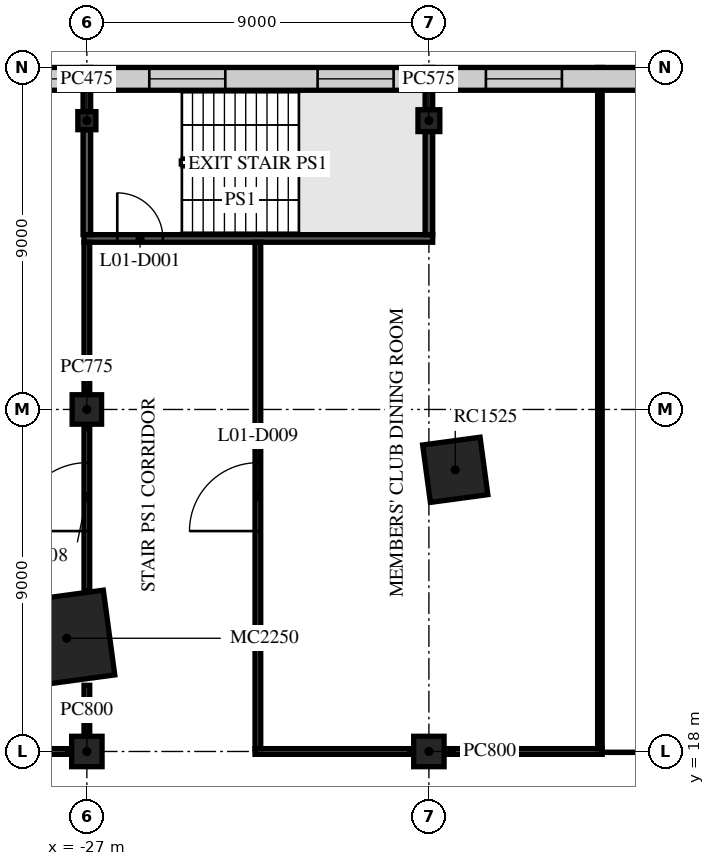
"""IFC4 building model, lengths in metres.
Left out: names, types, materials, properties, quantities, classifications, styles, units other than length and angle.
Written with IfcOpenShell. Run it as: python <this file> out.ifc"""

import sys

from ifc_helpers import new_model, si_unit, direction, frame, frame_2d, origin, origin_2d, place, context, subcontext, project, spatial, rectangle, extrude, element, fill, save


model = new_model("IFC4")
c1 = context("Model", 3, precision=1e-05, world=origin(), true_north=direction((0.0, 1.0)))
c2 = subcontext(c1, "Body", "Model", "MODEL_VIEW")
j1 = project(units=[si_unit("LENGTHUNIT", "METRE"), si_unit("PLANEANGLEUNIT", "RADIAN")], contexts=[c1])
p1 = place(None, origin())
s1 = spatial("IfcSite", under=j1, at=p1, CompositionType="ELEMENT")
p2 = place(p1, origin())
s2 = spatial("IfcBuilding", under=s1, at=p2, CompositionType="ELEMENT")
p3 = place(p2, frame((0.0, 0.0, 4.5)))
s3 = spatial("IfcBuildingStorey", under=s2, at=p3, CompositionType="ELEMENT", Elevation=4.5)
p4 = place(p3, frame((-27.0, 18.0, 0.0), z_axis=(0.0, 0.0, 1.0), x_axis=(1.0, 0.0, 0.0)))
e1 = element("IfcColumn", 1, at=p4, inside=s3, PredefinedType="COLUMN", context=c2, shape_type="SweptSolid", body=[
    extrude(rectangle(XDim=0.8, YDim=0.8, at=origin_2d()), origin(), (0.0, 0.0, 1.0), 4.5),
])
p5 = place(p3, frame((-27.0, 27.0, 0.0), z_axis=(0.0, 0.0, 1.0), x_axis=(1.0, 0.0, 0.0)))
e2 = element("IfcColumn", 2, at=p5, inside=s3, PredefinedType="COLUMN", context=c2, shape_type="SweptSolid", body=[
    extrude(rectangle(XDim=0.775, YDim=0.775, at=origin_2d()), origin(), (0.0, 0.0, 1.0), 4.5),
])
p6 = place(p3, frame((-27.0, 34.6, 0.0), z_axis=(0.0, 0.0, 1.0), x_axis=(1.0, 0.0, 0.0)))
e3 = element("IfcColumn", 3, at=p6, inside=s3, PredefinedType="COLUMN", context=c2, shape_type="SweptSolid", body=[
    extrude(rectangle(XDim=0.475, YDim=0.475, at=origin_2d()), origin(), (0.0, 0.0, 1.0), 4.5),
])
p7 = place(p3, frame((-18.0, 18.0, 0.0), z_axis=(0.0, 0.0, 1.0), x_axis=(1.0, 0.0, 0.0)))
e4 = element("IfcColumn", 4, at=p7, inside=s3, PredefinedType="COLUMN", context=c2, shape_type="SweptSolid", body=[
    extrude(rectangle(XDim=0.8, YDim=0.8, at=origin_2d()), origin(), (0.0, 0.0, 1.0), 4.5),
])
p8 = place(p3, frame((-18.0, 34.6, 0.0), z_axis=(0.0, 0.0, 1.0), x_axis=(1.0, 0.0, 0.0)))
e5 = element("IfcColumn", 5, at=p8, inside=s3, PredefinedType="COLUMN", context=c2, shape_type="SweptSolid", body=[
    extrude(rectangle(XDim=0.575, YDim=0.575, at=origin_2d()), origin(), (0.0, 0.0, 1.0), 4.5),
])
p9 = place(p3, frame((-17.307, 25.412, 0.0), z_axis=(0.0, 0.0, 1.0), x_axis=(0.991001197216, 0.133853005627, 0.0)))
e6 = element("IfcColumn", 6, at=p9, inside=s3, PredefinedType="COLUMN", context=c2, shape_type="SweptSolid", body=[
    extrude(rectangle(XDim=1.525, YDim=1.525, at=origin_2d()), origin(), (0.0, 0.0, 1.0), 4.5),
])
p10 = place(p3, frame((-27.531, 20.979, 0.0), z_axis=(0.0, 0.0, 1.0), x_axis=(0.991001197216, 0.133853005627, 0.0)))
e7 = element("IfcColumn", 7, at=p10, inside=s3, PredefinedType="COLUMN", context=c2, shape_type="SweptSolid", body=[
    extrude(rectangle(XDim=2.25, YDim=2.25, at=origin_2d()), origin(), (0.0, 0.0, 1.0), 4.5),
])
p11 = place(p3, frame((-34.1, 18.0, 0.0), z_axis=(0.0, 0.0, 1.0), x_axis=(1.0, 0.0, 0.0)))
e8 = element("IfcWall", 8, at=p11, inside=s3, PredefinedType="PARTITIONING", context=c2, shape_type="SweptSolid", body=[
    extrude(rectangle(XDim=6.6, YDim=0.15, at=frame_2d((3.3, 0.0))), origin(), (0.0, 0.0, 1.0), 4.1),
])
p12 = place(p3, frame((-22.575, 18.0, 0.0), z_axis=(0.0, 0.0, 1.0), x_axis=(1.0, 0.0, 0.0)))
e9 = element("IfcWall", 9, at=p12, inside=s3, PredefinedType="PARTITIONING", context=c2, shape_type="SweptSolid", body=[
    extrude(rectangle(XDim=4.075, YDim=0.15, at=frame_2d((2.038, 0.0))), origin(), (0.0, 0.0, 1.0), 4.1),
])
p13 = place(p3, frame((-17.5, 18.0, 0.0), z_axis=(0.0, 0.0, 1.0), x_axis=(1.0, 0.0, 0.0)))
e10 = element("IfcWall", 10, at=p13, inside=s3, PredefinedType="PARTITIONING", context=c2, shape_type="SweptSolid", body=[
    extrude(rectangle(XDim=4.06, YDim=0.15, at=frame_2d((2.03, 0.0))), origin(), (0.0, 0.0, 1.0), 4.1),
])
p14 = place(p3, frame((-27.075, 31.5, 0.0), z_axis=(0.0, 0.0, 1.0), x_axis=(1.0, 0.0, 0.0)))
e11 = element("IfcWall", 11, at=p14, inside=s3, PredefinedType="PARTITIONING", context=c2, shape_type="SweptSolid", body=[
    extrude(rectangle(XDim=9.175, YDim=0.2, at=frame_2d((4.587, 0.0))), origin(), (0.0, 0.0, 1.0), 4.1),
])
p15 = place(p14, frame((0.875, 0.0, 0.0)))
e12 = element("IfcOpeningElement", 12, at=p15, cuts=e11, PredefinedType="OPENING", context=c2, shape_type="SweptSolid", body=[
    extrude(rectangle(XDim=1.2, YDim=2.1, at=frame_2d((0.6, 1.05))), frame((0.0, 0.11, 0.0), z_axis=(0.0, -1.0, 0.0), x_axis=(1.0, 0.0, 0.0)), (0.0, 0.0, 1.0), 0.22),
])
p16 = place(p3, frame((-27.0, 18.5, 0.0), z_axis=(0.0, 0.0, 1.0), x_axis=(0.0, 1.0, 0.0)))
e13 = element("IfcWall", 13, at=p16, inside=s3, PredefinedType="PARTITIONING", context=c2, shape_type="SweptSolid", body=[
    extrude(rectangle(XDim=1.242, YDim=0.15, at=frame_2d((0.621, 0.0))), origin(), (0.0, 0.0, 1.0), 4.1),
])
p17 = place(p3, frame((-27.0, 22.216, 0.0), z_axis=(0.0, 0.0, 1.0), x_axis=(0.0, 1.0, 0.0)))
e14 = element("IfcWall", 14, at=p17, inside=s3, PredefinedType="PARTITIONING", context=c2, shape_type="SweptSolid", body=[
    extrude(rectangle(XDim=4.284, YDim=0.15, at=frame_2d((2.142, 0.0))), origin(), (0.0, 0.0, 1.0), 4.1),
])
p18 = place(p17, frame((1.584, 0.0, 0.0)))
e15 = element("IfcOpeningElement", 15, at=p18, cuts=e14, PredefinedType="OPENING", context=c2, shape_type="SweptSolid", body=[
    extrude(rectangle(XDim=1.8, YDim=2.1, at=frame_2d((0.9, 1.05))), frame((0.0, 0.085, 0.0), z_axis=(0.0, -1.0, 0.0), x_axis=(1.0, 0.0, 0.0)), (0.0, 0.0, 1.0), 0.17),
])
p19 = place(p3, frame((-27.0, 27.5, 0.0), z_axis=(0.0, 0.0, 1.0), x_axis=(0.0, 1.0, 0.0)))
e16 = element("IfcWall", 16, at=p19, inside=s3, PredefinedType="PARTITIONING", context=c2, shape_type="SweptSolid", body=[
    extrude(rectangle(XDim=3.9, YDim=0.15, at=frame_2d((1.95, 0.0))), origin(), (0.0, 0.0, 1.0), 4.1),
])
p20 = place(p3, frame((-27.0, 31.6, 0.0), z_axis=(0.0, 0.0, 1.0), x_axis=(0.0, 1.0, 0.0)))
e17 = element("IfcWall", 17, at=p20, inside=s3, PredefinedType="PARTITIONING", context=c2, shape_type="SweptSolid", body=[
    extrude(rectangle(XDim=2.762, YDim=0.2, at=frame_2d((1.381, 0.0))), origin(), (0.0, 0.0, 1.0), 4.1),
])
p21 = place(p3, frame((-27.0, 34.837, 0.0), z_axis=(0.0, 0.0, 1.0), x_axis=(0.0, 1.0, 0.0)))
e18 = element("IfcWall", 18, at=p21, inside=s3, PredefinedType="PARTITIONING", context=c2, shape_type="SweptSolid", body=[
    extrude(rectangle(XDim=1.163, YDim=0.2, at=frame_2d((0.581, 0.0))), origin(), (0.0, 0.0, 1.0), 4.1),
])
p22 = place(p3, frame((-22.5, 18.075, 0.0), z_axis=(0.0, 0.0, 1.0), x_axis=(0.0, 1.0, 0.0)))
e19 = element("IfcWall", 19, at=p22, inside=s3, PredefinedType="PARTITIONING", context=c2, shape_type="SweptSolid", body=[
    extrude(rectangle(XDim=13.325, YDim=0.15, at=frame_2d((6.663, 0.0))), origin(), (0.0, 0.0, 1.0), 4.1),
])
p23 = place(p22, frame((5.725, 0.0, 0.0)))
e20 = element("IfcOpeningElement", 20, at=p23, cuts=e19, PredefinedType="OPENING", context=c2, shape_type="SweptSolid", body=[
    extrude(rectangle(XDim=1.8, YDim=2.1, at=frame_2d((0.9, 1.05))), frame((0.0, 0.085, 0.0), z_axis=(0.0, -1.0, 0.0), x_axis=(1.0, 0.0, 0.0)), (0.0, 0.0, 1.0), 0.17),
])
p24 = place(p3, frame((-18.0, 31.6, 0.0), z_axis=(0.0, 0.0, 1.0), x_axis=(0.0, 1.0, 0.0)))
e21 = element("IfcWall", 21, at=p24, inside=s3, PredefinedType="PARTITIONING", context=c2, shape_type="SweptSolid", body=[
    extrude(rectangle(XDim=2.712, YDim=0.2, at=frame_2d((1.356, 0.0))), origin(), (0.0, 0.0, 1.0), 4.1),
])
p25 = place(p3, frame((-18.0, 34.887, 0.0), z_axis=(0.0, 0.0, 1.0), x_axis=(0.0, 1.0, 0.0)))
e22 = element("IfcWall", 22, at=p25, inside=s3, PredefinedType="PARTITIONING", context=c2, shape_type="SweptSolid", body=[
    extrude(rectangle(XDim=1.113, YDim=0.2, at=frame_2d((0.556, 0.0))), origin(), (0.0, 0.0, 1.0), 4.1),
])
p26 = place(p3, frame((-13.5, 18.075, 0.0), z_axis=(0.0, 0.0, 1.0), x_axis=(0.0, 1.0, 0.0)))
e23 = element("IfcWall", 23, at=p26, inside=s3, PredefinedType="PARTITIONING", context=c2, shape_type="SweptSolid", body=[
    extrude(rectangle(XDim=17.925, YDim=0.12, at=frame_2d((8.962, 0.0))), origin(), (0.0, 0.0, 1.0), 4.1),
])
p27 = place(p3, frame((30.876, 35.7, 0.0), z_axis=(0.0, 0.0, 1.0), x_axis=(-1.0, 0.0, 0.0)))
e24 = element("IfcWall", 24, at=p27, inside=s3, PredefinedType="STANDARD", context=c2, shape_type="SweptSolid", body=[
    extrude(rectangle(XDim=61.751, YDim=0.6, at=frame_2d((30.876, 0.0))), origin(), (0.0, 0.0, 1.0), 4.1),
])
p28 = place(p27, frame((1.152, 0.0, 0.9)))
e25 = element("IfcOpeningElement", 25, at=p28, cuts=e24, PredefinedType="OPENING", context=c2, shape_type="SweptSolid", body=[
    extrude(rectangle(XDim=2.0, YDim=3.0, at=frame_2d((1.0, 1.5))), frame((0.0, 0.31, 0.0), z_axis=(0.0, -1.0, 0.0), x_axis=(1.0, 0.0, 0.0)), (0.0, 0.0, 1.0), 0.62),
])
p29 = place(p27, frame((5.519, 0.0, 0.9)))
e26 = element("IfcOpeningElement", 26, at=p29, cuts=e24, PredefinedType="OPENING", context=c2, shape_type="SweptSolid", body=[
    extrude(rectangle(XDim=2.0, YDim=3.0, at=frame_2d((1.0, 1.5))), frame((0.0, 0.31, 0.0), z_axis=(0.0, -1.0, 0.0), x_axis=(1.0, 0.0, 0.0)), (0.0, 0.0, 1.0), 0.62),
])
p30 = place(p27, frame((9.947, 0.0, 0.9)))
e27 = element("IfcOpeningElement", 27, at=p30, cuts=e24, PredefinedType="OPENING", context=c2, shape_type="SweptSolid", body=[
    extrude(rectangle(XDim=2.0, YDim=3.0, at=frame_2d((1.0, 1.5))), frame((0.0, 0.31, 0.0), z_axis=(0.0, -1.0, 0.0), x_axis=(1.0, 0.0, 0.0)), (0.0, 0.0, 1.0), 0.62),
])
p31 = place(p27, frame((14.376, 0.0, 0.9)))
e28 = element("IfcOpeningElement", 28, at=p31, cuts=e24, PredefinedType="OPENING", context=c2, shape_type="SweptSolid", body=[
    extrude(rectangle(XDim=2.0, YDim=3.0, at=frame_2d((1.0, 1.5))), frame((0.0, 0.31, 0.0), z_axis=(0.0, -1.0, 0.0), x_axis=(1.0, 0.0, 0.0)), (0.0, 0.0, 1.0), 0.62),
])
p32 = place(p27, frame((18.804, 0.0, 0.9)))
e29 = element("IfcOpeningElement", 29, at=p32, cuts=e24, PredefinedType="OPENING", context=c2, shape_type="SweptSolid", body=[
    extrude(rectangle(XDim=2.0, YDim=3.0, at=frame_2d((1.0, 1.5))), frame((0.0, 0.31, 0.0), z_axis=(0.0, -1.0, 0.0), x_axis=(1.0, 0.0, 0.0)), (0.0, 0.0, 1.0), 0.62),
])
p33 = place(p27, frame((23.233, 0.0, 0.9)))
e30 = element("IfcOpeningElement", 30, at=p33, cuts=e24, PredefinedType="OPENING", context=c2, shape_type="SweptSolid", body=[
    extrude(rectangle(XDim=2.0, YDim=3.0, at=frame_2d((1.0, 1.5))), frame((0.0, 0.31, 0.0), z_axis=(0.0, -1.0, 0.0), x_axis=(1.0, 0.0, 0.0)), (0.0, 0.0, 1.0), 0.62),
])
p34 = place(p27, frame((27.662, 0.0, 0.9)))
e31 = element("IfcOpeningElement", 31, at=p34, cuts=e24, PredefinedType="OPENING", context=c2, shape_type="SweptSolid", body=[
    extrude(rectangle(XDim=2.0, YDim=3.0, at=frame_2d((1.0, 1.5))), frame((0.0, 0.31, 0.0), z_axis=(0.0, -1.0, 0.0), x_axis=(1.0, 0.0, 0.0)), (0.0, 0.0, 1.0), 0.62),
])
p35 = place(p27, frame((32.09, 0.0, 0.9)))
e32 = element("IfcOpeningElement", 32, at=p35, cuts=e24, PredefinedType="OPENING", context=c2, shape_type="SweptSolid", body=[
    extrude(rectangle(XDim=2.0, YDim=3.0, at=frame_2d((1.0, 1.5))), frame((0.0, 0.31, 0.0), z_axis=(0.0, -1.0, 0.0), x_axis=(1.0, 0.0, 0.0)), (0.0, 0.0, 1.0), 0.62),
])
p36 = place(p27, frame((36.519, 0.0, 0.9)))
e33 = element("IfcOpeningElement", 33, at=p36, cuts=e24, PredefinedType="OPENING", context=c2, shape_type="SweptSolid", body=[
    extrude(rectangle(XDim=2.0, YDim=3.0, at=frame_2d((1.0, 1.5))), frame((0.0, 0.31, 0.0), z_axis=(0.0, -1.0, 0.0), x_axis=(1.0, 0.0, 0.0)), (0.0, 0.0, 1.0), 0.62),
])
p37 = place(p27, frame((40.947, 0.0, 0.9)))
e34 = element("IfcOpeningElement", 34, at=p37, cuts=e24, PredefinedType="OPENING", context=c2, shape_type="SweptSolid", body=[
    extrude(rectangle(XDim=2.0, YDim=3.0, at=frame_2d((1.0, 1.5))), frame((0.0, 0.31, 0.0), z_axis=(0.0, -1.0, 0.0), x_axis=(1.0, 0.0, 0.0)), (0.0, 0.0, 1.0), 0.62),
])
p38 = place(p27, frame((45.376, 0.0, 0.9)))
e35 = element("IfcOpeningElement", 35, at=p38, cuts=e24, PredefinedType="OPENING", context=c2, shape_type="SweptSolid", body=[
    extrude(rectangle(XDim=2.0, YDim=3.0, at=frame_2d((1.0, 1.5))), frame((0.0, 0.31, 0.0), z_axis=(0.0, -1.0, 0.0), x_axis=(1.0, 0.0, 0.0)), (0.0, 0.0, 1.0), 0.62),
])
p39 = place(p27, frame((49.804, 0.0, 0.9)))
e36 = element("IfcOpeningElement", 36, at=p39, cuts=e24, PredefinedType="OPENING", context=c2, shape_type="SweptSolid", body=[
    extrude(rectangle(XDim=2.0, YDim=3.0, at=frame_2d((1.0, 1.5))), frame((0.0, 0.31, 0.0), z_axis=(0.0, -1.0, 0.0), x_axis=(1.0, 0.0, 0.0)), (0.0, 0.0, 1.0), 0.62),
])
p40 = place(p27, frame((54.233, 0.0, 0.9)))
e37 = element("IfcOpeningElement", 37, at=p40, cuts=e24, PredefinedType="OPENING", context=c2, shape_type="SweptSolid", body=[
    extrude(rectangle(XDim=2.0, YDim=3.0, at=frame_2d((1.0, 1.5))), frame((0.0, 0.31, 0.0), z_axis=(0.0, -1.0, 0.0), x_axis=(1.0, 0.0, 0.0)), (0.0, 0.0, 1.0), 0.62),
])
p41 = place(p27, frame((58.599, 0.0, 0.9)))
e38 = element("IfcOpeningElement", 38, at=p41, cuts=e24, PredefinedType="OPENING", context=c2, shape_type="SweptSolid", body=[
    extrude(rectangle(XDim=2.0, YDim=3.0, at=frame_2d((1.0, 1.5))), frame((0.0, 0.31, 0.0), z_axis=(0.0, -1.0, 0.0), x_axis=(1.0, 0.0, 0.0)), (0.0, 0.0, 1.0), 0.62),
])
p42 = place(p15, origin())
e39 = element("IfcDoor", 39, at=p42, inside=s3, OperationType="SINGLE_SWING_LEFT", PredefinedType="DOOR", context=c2, shape_type="SweptSolid", body=[
    extrude(rectangle(XDim=1.2, YDim=2.1, at=frame_2d((0.6, 1.05))), frame((0.0, 0.025, 0.0), z_axis=(0.0, -1.0, 0.0), x_axis=(1.0, 0.0, 0.0)), (0.0, 0.0, 1.0), 0.05),
])
fill(e12, e39)
p43 = place(p18, origin())
e40 = element("IfcDoor", 40, at=p43, inside=s3, OperationType="DOUBLE_DOOR_SINGLE_SWING", PredefinedType="DOOR", context=c2, shape_type="SweptSolid", body=[
    extrude(rectangle(XDim=1.8, YDim=2.1, at=frame_2d((0.9, 1.05))), frame((0.0, 0.025, 0.0), z_axis=(0.0, -1.0, 0.0), x_axis=(1.0, 0.0, 0.0)), (0.0, 0.0, 1.0), 0.05),
])
fill(e15, e40)
p44 = place(p23, origin())
e41 = element("IfcDoor", 41, at=p44, inside=s3, OperationType="DOUBLE_DOOR_SINGLE_SWING", PredefinedType="DOOR", context=c2, shape_type="SweptSolid", body=[
    extrude(rectangle(XDim=1.8, YDim=2.1, at=frame_2d((0.9, 1.05))), frame((0.0, 0.025, 0.0), z_axis=(0.0, -1.0, 0.0), x_axis=(1.0, 0.0, 0.0)), (0.0, 0.0, 1.0), 0.05),
])
fill(e20, e41)
p45 = place(p38, origin())
e42 = element("IfcWindow", 42, at=p45, inside=s3, PartitioningType="SINGLE_PANEL", PredefinedType="WINDOW", context=c2, shape_type="SweptSolid", body=[
    extrude(rectangle(XDim=2.0, YDim=3.0, at=frame_2d((1.0, 1.5))), frame((0.0, 0.03, 0.0), z_axis=(0.0, -1.0, 0.0), x_axis=(1.0, 0.0, 0.0)), (0.0, 0.0, 1.0), 0.06),
])
fill(e35, e42)
p46 = place(p39, origin())
e43 = element("IfcWindow", 43, at=p46, inside=s3, PartitioningType="SINGLE_PANEL", PredefinedType="WINDOW", context=c2, shape_type="SweptSolid", body=[
    extrude(rectangle(XDim=2.0, YDim=3.0, at=frame_2d((1.0, 1.5))), frame((0.0, 0.03, 0.0), z_axis=(0.0, -1.0, 0.0), x_axis=(1.0, 0.0, 0.0)), (0.0, 0.0, 1.0), 0.06),
])
fill(e36, e43)
p47 = place(p40, origin())
e44 = element("IfcWindow", 44, at=p47, inside=s3, PartitioningType="SINGLE_PANEL", PredefinedType="WINDOW", context=c2, shape_type="SweptSolid", body=[
    extrude(rectangle(XDim=2.0, YDim=3.0, at=frame_2d((1.0, 1.5))), frame((0.0, 0.03, 0.0), z_axis=(0.0, -1.0, 0.0), x_axis=(1.0, 0.0, 0.0)), (0.0, 0.0, 1.0), 0.06),
])
fill(e37, e44)
p48 = place(p41, origin())
e45 = element("IfcWindow", 45, at=p48, inside=s3, PartitioningType="SINGLE_PANEL", PredefinedType="WINDOW", context=c2, shape_type="SweptSolid", body=[
    extrude(rectangle(XDim=2.0, YDim=3.0, at=frame_2d((1.0, 1.5))), frame((0.0, 0.03, 0.0), z_axis=(0.0, -1.0, 0.0), x_axis=(1.0, 0.0, 0.0)), (0.0, 0.0, 1.0), 0.06),
])
fill(e38, e45)
save(model, sys.argv[1])
